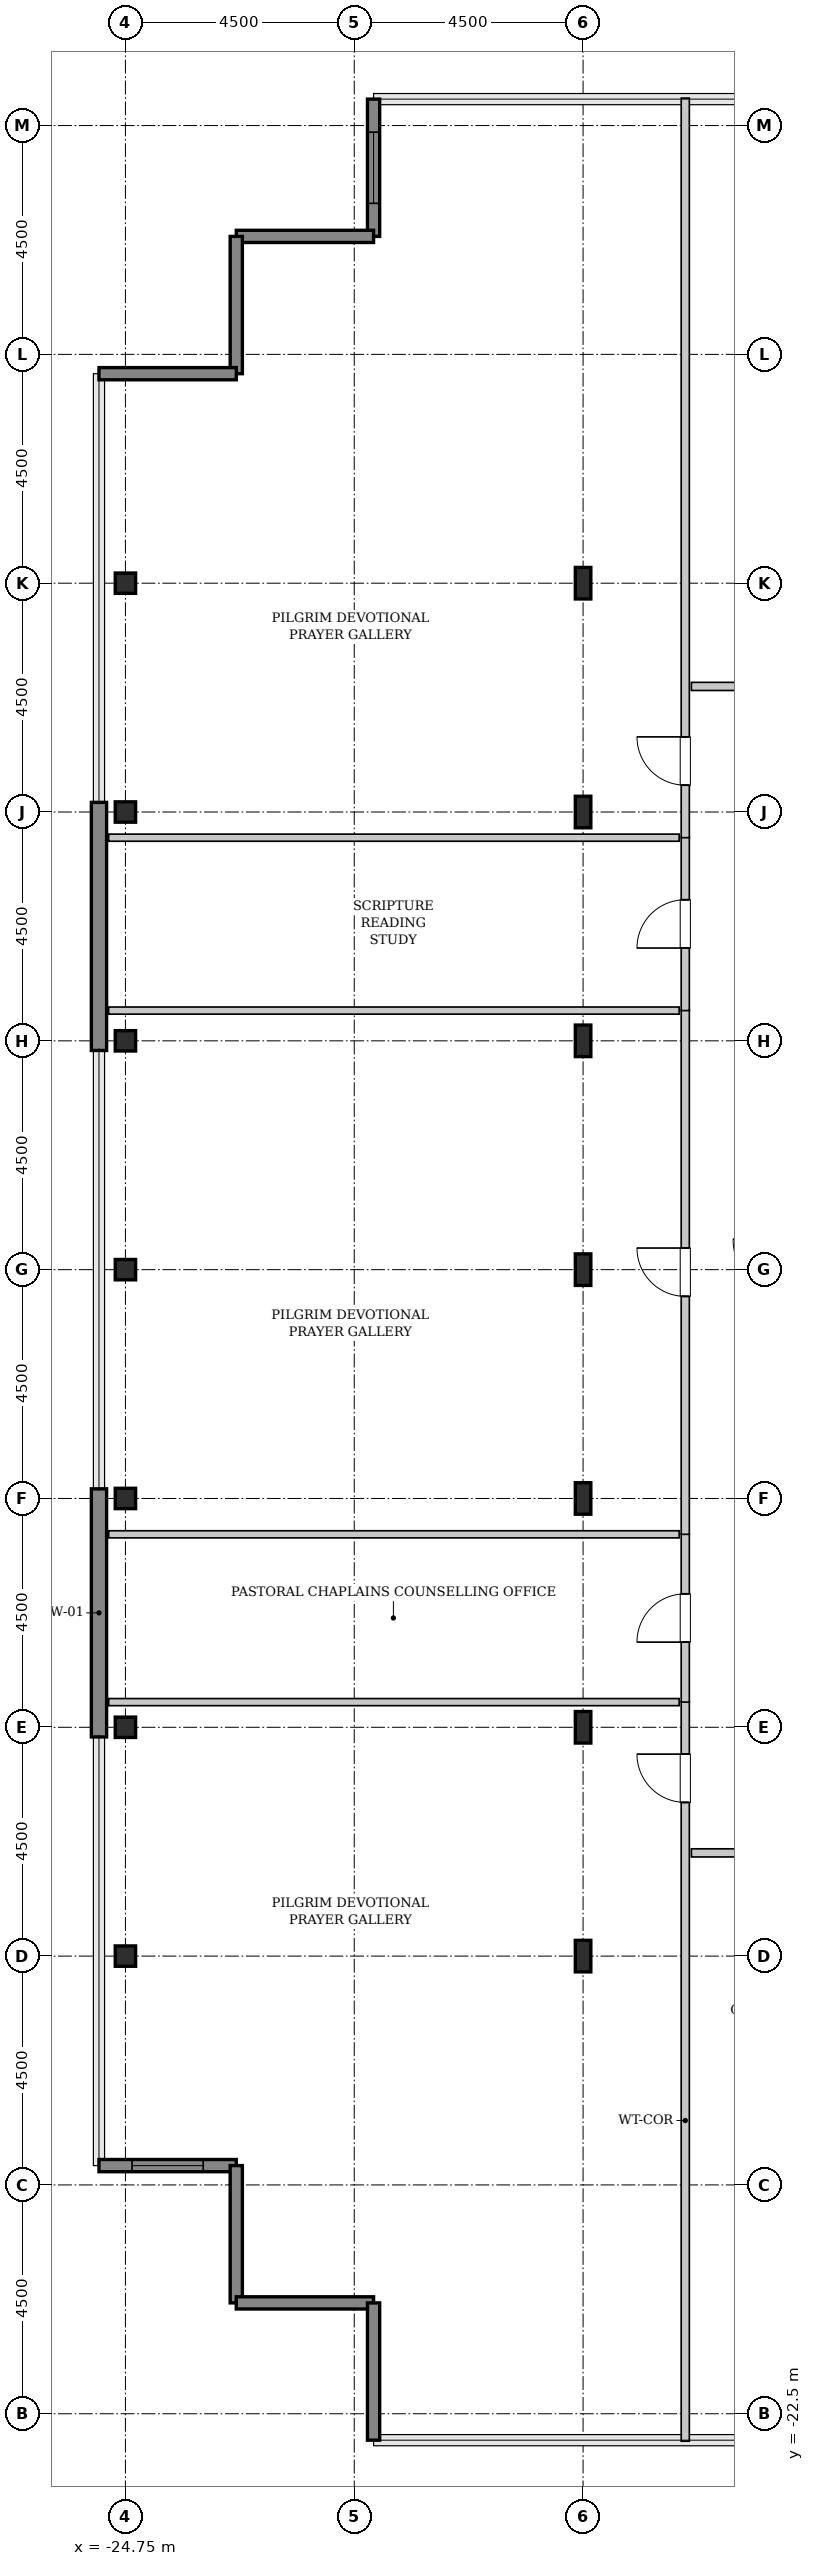
"""IFC4 building model, lengths in metres.
Left out: names, types, materials, properties, quantities, classifications, styles, units other than length and angle.
Written with IfcOpenShell. Run it as: python <this file> out.ifc"""

import sys

from ifc_helpers import new_model, si_unit, direction, frame, frame_2d, origin, origin_2d, place, context, subcontext, project, spatial, rectangle, hollow_rectangle, i_section, extrude, source, transform, mapped, element, fill, save


model = new_model("IFC4")
c1 = context("Model", 3, precision=1e-05, world=origin(), true_north=direction((0.0, 1.0)))
c2 = subcontext(c1, "Body", "Model", "MODEL_VIEW")
j1 = project(units=[si_unit("LENGTHUNIT", "METRE"), si_unit("PLANEANGLEUNIT", "RADIAN")], contexts=[c1])
p1 = place(None, origin())
s1 = spatial("IfcSite", under=j1, at=p1, CompositionType="ELEMENT")
p2 = place(p1, origin())
s2 = spatial("IfcBuilding", under=s1, at=p2, CompositionType="ELEMENT")
p3 = place(p2, frame((0.0, 0.0, 345.2)))
s3 = spatial("IfcBuildingStorey", under=s2, at=p3, CompositionType="ELEMENT", Elevation=345.2)
m1 = source(origin(), c2, "Body", "SweptSolid", [
    extrude(hollow_rectangle(XDim=0.4, YDim=0.4, WallThickness=0.02, InnerFilletRadius=0.02, OuterFilletRadius=0.04, at=origin_2d()), origin(), (0.0, 0.0, 1.0), 3.8),
])
for number, where, z_axis, x_axis in (
    (1, (-24.75, -13.5, 0.0), (0.0, 0.0, 1.0), (1.0, 0.0, 0.0)),
    (2, (-24.75, -9.0, 0.0), (0.0, 0.0, 1.0), (1.0, 0.0, 0.0)),
    (3, (-24.75, -4.5, 0.0), (0.0, 0.0, 1.0), (1.0, 0.0, 0.0)),
    (4, (-24.75, 0.0, 0.0), (0.0, 0.0, 1.0), (1.0, 0.0, 0.0)),
    (5, (-24.75, 4.5, 0.0), (0.0, 0.0, 1.0), (1.0, 0.0, 0.0)),
    (6, (-24.75, 9.0, 0.0), (0.0, 0.0, 1.0), (1.0, 0.0, 0.0)),
    (7, (-24.75, 13.5, 0.0), (0.0, 0.0, 1.0), (1.0, 0.0, 0.0)),
):
    element("IfcColumn", number, at=place(p3, frame(where, z_axis=z_axis, x_axis=x_axis)), inside=s3, PredefinedType="COLUMN", context=c2, shape_type="MappedRepresentation", body=[
        mapped(m1, transform((0.0, 0.0, 0.0), x_axis=(1.0, 0.0, 0.0), y_axis=(0.0, 1.0, 0.0), z_axis=(0.0, 0.0, 1.0), scale=1.0)),
    ])
m2 = source(origin(), c2, "Body", "SweptSolid", [
    extrude(i_section(OverallWidth=0.305, OverallDepth=0.62, WebThickness=0.021, FlangeThickness=0.04, FilletRadius=0.027, at=origin_2d()), origin(), (0.0, 0.0, 1.0), 3.8),
])
for number, where, z_axis, x_axis in (
    (8, (-15.75, -13.5, 0.0), (0.0, 0.0, 1.0), (1.0, 0.0, 0.0)),
    (9, (-15.75, -9.0, 0.0), (0.0, 0.0, 1.0), (1.0, 0.0, 0.0)),
    (10, (-15.75, -4.5, 0.0), (0.0, 0.0, 1.0), (1.0, 0.0, 0.0)),
    (11, (-15.75, 0.0, 0.0), (0.0, 0.0, 1.0), (1.0, 0.0, 0.0)),
    (12, (-15.75, 4.5, 0.0), (0.0, 0.0, 1.0), (1.0, 0.0, 0.0)),
    (13, (-15.75, 9.0, 0.0), (0.0, 0.0, 1.0), (1.0, 0.0, 0.0)),
    (14, (-15.75, 13.5, 0.0), (0.0, 0.0, 1.0), (1.0, 0.0, 0.0)),
):
    element("IfcColumn", number, at=place(p3, frame(where, z_axis=z_axis, x_axis=x_axis)), inside=s3, PredefinedType="COLUMN", context=c2, shape_type="MappedRepresentation", body=[
        mapped(m2, transform((0.0, 0.0, 0.0), x_axis=(1.0, 0.0, 0.0), y_axis=(0.0, 1.0, 0.0), z_axis=(0.0, 0.0, 1.0), scale=1.0)),
    ])
m3 = source(origin(), c2, "Body", "SweptSolid", [
    extrude(rectangle(XDim=4.88, YDim=0.3, at=frame_2d((2.44, 0.0))), origin(), (0.0, 0.0, 1.0), 3.5),
])
for number, where, z_axis, x_axis in (
    (15, (-25.27, -9.19, 0.0), (0.0, 0.0, 1.0), (0.0, 1.0, 0.0)),
    (16, (-25.27, 4.31, 0.0), (0.0, 0.0, 1.0), (0.0, 1.0, 0.0)),
):
    element("IfcWall", number, at=place(p3, frame(where, z_axis=z_axis, x_axis=x_axis)), inside=s3, PredefinedType="SHEAR", context=c2, shape_type="MappedRepresentation", body=[
        mapped(m3, transform((0.0, 0.0, 0.0), x_axis=(1.0, 0.0, 0.0), y_axis=(0.0, 1.0, 0.0), z_axis=(0.0, 0.0, 1.0), scale=1.0)),
    ])
m4 = source(origin(), c2, "Body", "SweptSolid", [
    extrude(rectangle(XDim=2.7, YDim=0.24, at=frame_2d((1.35, 0.0))), origin(), (0.0, 0.0, 1.0), 3.5),
])
p4 = place(p3, frame((-19.87, 23.02, 0.0), z_axis=(0.0, 0.0, 1.0), x_axis=(0.0, -1.0, 0.0)))
e17 = element("IfcWall", 17, at=p4, inside=s3, PredefinedType="SHEAR", context=c2, shape_type="MappedRepresentation", body=[
    mapped(m4, transform((0.0, 0.0, 0.0), x_axis=(1.0, 0.0, 0.0), y_axis=(0.0, 1.0, 0.0), z_axis=(0.0, 0.0, 1.0), scale=1.0)),
])
p5 = place(p4, frame((0.65, 0.0, 0.85)))
e18 = element("IfcOpeningElement", 18, at=p5, cuts=e17, PredefinedType="OPENING", context=c2, shape_type="SweptSolid", body=[
    extrude(rectangle(XDim=1.4, YDim=1.8, at=frame_2d((0.7, 0.9))), frame((0.0, 0.13, 0.0), z_axis=(0.0, -1.0, 0.0), x_axis=(1.0, 0.0, 0.0)), (0.0, 0.0, 1.0), 0.26),
])
for number, where, z_axis, x_axis in (
    (19, (-19.87, 20.32, 0.0), (0.0, 0.0, 1.0), (-1.0, 0.0, 0.0)),
    (20, (-22.57, 20.32, 0.0), (0.0, 0.0, 1.0), (0.0, -1.0, 0.0)),
    (21, (-22.57, 17.62, 0.0), (0.0, 0.0, 1.0), (-1.0, 0.0, 0.0)),
):
    element("IfcWall", number, at=place(p3, frame(where, z_axis=z_axis, x_axis=x_axis)), inside=s3, PredefinedType="SHEAR", context=c2, shape_type="MappedRepresentation", body=[
        mapped(m4, transform((0.0, 0.0, 0.0), x_axis=(1.0, 0.0, 0.0), y_axis=(0.0, 1.0, 0.0), z_axis=(0.0, 0.0, 1.0), scale=1.0)),
    ])
p6 = place(p3, frame((-25.27, -17.62, 0.0), z_axis=(0.0, 0.0, 1.0), x_axis=(1.0, 0.0, 0.0)))
e22 = element("IfcWall", 22, at=p6, inside=s3, PredefinedType="SHEAR", context=c2, shape_type="MappedRepresentation", body=[
    mapped(m4, transform((0.0, 0.0, 0.0), x_axis=(1.0, 0.0, 0.0), y_axis=(0.0, 1.0, 0.0), z_axis=(0.0, 0.0, 1.0), scale=1.0)),
])
p7 = place(p6, frame((0.65, 0.0, 0.85)))
e23 = element("IfcOpeningElement", 23, at=p7, cuts=e22, PredefinedType="OPENING", context=c2, shape_type="SweptSolid", body=[
    extrude(rectangle(XDim=1.4, YDim=1.8, at=frame_2d((0.7, 0.9))), frame((0.0, 0.13, 0.0), z_axis=(0.0, -1.0, 0.0), x_axis=(1.0, 0.0, 0.0)), (0.0, 0.0, 1.0), 0.26),
])
for number, where, z_axis, x_axis in (
    (24, (-22.57, -17.62, 0.0), (0.0, 0.0, 1.0), (0.0, -1.0, 0.0)),
    (25, (-22.57, -20.32, 0.0), (0.0, 0.0, 1.0), (1.0, 0.0, 0.0)),
    (26, (-19.87, -20.32, 0.0), (0.0, 0.0, 1.0), (0.0, -1.0, 0.0)),
):
    element("IfcWall", number, at=place(p3, frame(where, z_axis=z_axis, x_axis=x_axis)), inside=s3, PredefinedType="SHEAR", context=c2, shape_type="MappedRepresentation", body=[
        mapped(m4, transform((0.0, 0.0, 0.0), x_axis=(1.0, 0.0, 0.0), y_axis=(0.0, 1.0, 0.0), z_axis=(0.0, 0.0, 1.0), scale=1.0)),
    ])
m5 = source(origin(), c2, "Body", "SweptSolid", [
    extrude(rectangle(XDim=14.545, YDim=0.16, at=frame_2d((7.272, 0.0))), origin(), (0.0, 0.0, 1.0), 3.485),
])
p8 = place(p3, frame((-13.74, -23.04, 0.0), z_axis=(0.0, 0.0, 1.0), x_axis=(0.0, 1.0, 0.0)))
e27 = element("IfcWall", 27, at=p8, inside=s3, PredefinedType="PARTITIONING", context=c2, shape_type="MappedRepresentation", body=[
    mapped(m5, transform((0.0, 0.0, 0.0), x_axis=(1.0, 0.0, 0.0), y_axis=(0.0, 1.0, 0.0), z_axis=(0.0, 0.0, 1.0), scale=1.0)),
])
p9 = place(p8, frame((12.562, 0.0, 0.0)))
e28 = element("IfcOpeningElement", 28, at=p9, cuts=e27, PredefinedType="OPENING", context=c2, shape_type="SweptSolid", body=[
    extrude(rectangle(XDim=0.95, YDim=2.1, at=frame_2d((0.475, 1.05))), frame((0.0, 0.09, 0.0), z_axis=(0.0, -1.0, 0.0), x_axis=(1.0, 0.0, 0.0)), (0.0, 0.0, 1.0), 0.18),
])
m6 = source(origin(), c2, "Body", "SweptSolid", [
    extrude(rectangle(XDim=11.22, YDim=0.14, at=frame_2d((5.61, 0.0))), origin(), (0.0, 0.0, 1.0), 2.925),
])
p10 = place(p3, frame((-25.08, -8.505, 0.0), z_axis=(0.0, 0.0, 1.0), x_axis=(1.0, 0.0, 0.0)))
e29 = element("IfcWall", 29, at=p10, inside=s3, PredefinedType="PARTITIONING", context=c2, shape_type="MappedRepresentation", body=[
    mapped(m6, transform((0.0, 0.0, 0.0), x_axis=(1.0, 0.0, 0.0), y_axis=(0.0, 1.0, 0.0), z_axis=(0.0, 0.0, 1.0), scale=1.0)),
])
m7 = source(origin(), c2, "Body", "SweptSolid", [
    extrude(rectangle(XDim=3.31, YDim=0.16, at=frame_2d((1.655, 0.0))), origin(), (0.0, 0.0, 1.0), 3.485),
])
p11 = place(p3, frame((-13.74, -8.505, 0.0), z_axis=(0.0, 0.0, 1.0), x_axis=(0.0, 1.0, 0.0)))
e30 = element("IfcWall", 30, at=p11, inside=s3, PredefinedType="PARTITIONING", context=c2, shape_type="MappedRepresentation", body=[
    mapped(m7, transform((0.0, 0.0, 0.0), x_axis=(1.0, 0.0, 0.0), y_axis=(0.0, 1.0, 0.0), z_axis=(0.0, 0.0, 1.0), scale=1.0)),
])
p12 = place(p11, frame((1.18, 0.0, 0.0)))
e31 = element("IfcOpeningElement", 31, at=p12, cuts=e30, PredefinedType="OPENING", context=c2, shape_type="SweptSolid", body=[
    extrude(rectangle(XDim=0.95, YDim=2.1, at=frame_2d((0.475, 1.05))), frame((0.0, 0.09, 0.0), z_axis=(0.0, -1.0, 0.0), x_axis=(1.0, 0.0, 0.0)), (0.0, 0.0, 1.0), 0.18),
])
m8 = source(origin(), c2, "Body", "SweptSolid", [
    extrude(rectangle(XDim=11.22, YDim=0.14, at=frame_2d((5.61, 0.0))), origin(), (0.0, 0.0, 1.0), 3.485),
])
p13 = place(p3, frame((-25.08, -5.205, 0.0), z_axis=(0.0, 0.0, 1.0), x_axis=(1.0, 0.0, 0.0)))
e32 = element("IfcWall", 32, at=p13, inside=s3, PredefinedType="PARTITIONING", context=c2, shape_type="MappedRepresentation", body=[
    mapped(m8, transform((0.0, 0.0, 0.0), x_axis=(1.0, 0.0, 0.0), y_axis=(0.0, 1.0, 0.0), z_axis=(0.0, 0.0, 1.0), scale=1.0)),
])
m9 = source(origin(), c2, "Body", "SweptSolid", [
    extrude(rectangle(XDim=10.31, YDim=0.16, at=frame_2d((5.155, 0.0))), origin(), (0.0, 0.0, 1.0), 3.485),
])
p14 = place(p3, frame((-13.74, -5.205, 0.0), z_axis=(0.0, 0.0, 1.0), x_axis=(0.0, 1.0, 0.0)))
e33 = element("IfcWall", 33, at=p14, inside=s3, PredefinedType="PARTITIONING", context=c2, shape_type="MappedRepresentation", body=[
    mapped(m9, transform((0.0, 0.0, 0.0), x_axis=(1.0, 0.0, 0.0), y_axis=(0.0, 1.0, 0.0), z_axis=(0.0, 0.0, 1.0), scale=1.0)),
])
p15 = place(p14, frame((4.68, 0.0, 0.0)))
e34 = element("IfcOpeningElement", 34, at=p15, cuts=e33, PredefinedType="OPENING", context=c2, shape_type="SweptSolid", body=[
    extrude(rectangle(XDim=0.95, YDim=2.1, at=frame_2d((0.475, 1.05))), frame((0.0, 0.09, 0.0), z_axis=(0.0, -1.0, 0.0), x_axis=(1.0, 0.0, 0.0)), (0.0, 0.0, 1.0), 0.18),
])
p16 = place(p3, frame((-25.08, 5.095, 0.0), z_axis=(0.0, 0.0, 1.0), x_axis=(1.0, 0.0, 0.0)))
e35 = element("IfcWall", 35, at=p16, inside=s3, PredefinedType="PARTITIONING", context=c2, shape_type="MappedRepresentation", body=[
    mapped(m8, transform((0.0, 0.0, 0.0), x_axis=(1.0, 0.0, 0.0), y_axis=(0.0, 1.0, 0.0), z_axis=(0.0, 0.0, 1.0), scale=1.0)),
])
m10 = source(origin(), c2, "Body", "SweptSolid", [
    extrude(rectangle(XDim=3.41, YDim=0.16, at=frame_2d((1.705, 0.0))), origin(), (0.0, 0.0, 1.0), 3.485),
])
p17 = place(p3, frame((-13.74, 5.095, 0.0), z_axis=(0.0, 0.0, 1.0), x_axis=(0.0, 1.0, 0.0)))
e36 = element("IfcWall", 36, at=p17, inside=s3, PredefinedType="PARTITIONING", context=c2, shape_type="MappedRepresentation", body=[
    mapped(m10, transform((0.0, 0.0, 0.0), x_axis=(1.0, 0.0, 0.0), y_axis=(0.0, 1.0, 0.0), z_axis=(0.0, 0.0, 1.0), scale=1.0)),
])
p18 = place(p17, frame((1.23, 0.0, 0.0)))
e37 = element("IfcOpeningElement", 37, at=p18, cuts=e36, PredefinedType="OPENING", context=c2, shape_type="SweptSolid", body=[
    extrude(rectangle(XDim=0.95, YDim=2.1, at=frame_2d((0.475, 1.05))), frame((0.0, 0.09, 0.0), z_axis=(0.0, -1.0, 0.0), x_axis=(1.0, 0.0, 0.0)), (0.0, 0.0, 1.0), 0.18),
])
p19 = place(p3, frame((-25.08, 8.495, 0.0), z_axis=(0.0, 0.0, 1.0), x_axis=(1.0, 0.0, 0.0)))
e38 = element("IfcWall", 38, at=p19, inside=s3, PredefinedType="PARTITIONING", context=c2, shape_type="MappedRepresentation", body=[
    mapped(m6, transform((0.0, 0.0, 0.0), x_axis=(1.0, 0.0, 0.0), y_axis=(0.0, 1.0, 0.0), z_axis=(0.0, 0.0, 1.0), scale=1.0)),
])
p20 = place(p3, frame((-13.74, 8.495, 0.0), z_axis=(0.0, 0.0, 1.0), x_axis=(0.0, 1.0, 0.0)))
e39 = element("IfcWall", 39, at=p20, inside=s3, PredefinedType="PARTITIONING", context=c2, shape_type="MappedRepresentation", body=[
    mapped(m5, transform((0.0, 0.0, 0.0), x_axis=(1.0, 0.0, 0.0), y_axis=(0.0, 1.0, 0.0), z_axis=(0.0, 0.0, 1.0), scale=1.0)),
])
p21 = place(p20, frame((1.032, 0.0, 0.0)))
e40 = element("IfcOpeningElement", 40, at=p21, cuts=e39, PredefinedType="OPENING", context=c2, shape_type="SweptSolid", body=[
    extrude(rectangle(XDim=0.95, YDim=2.1, at=frame_2d((0.475, 1.05))), frame((0.0, 0.09, 0.0), z_axis=(0.0, -1.0, 0.0), x_axis=(1.0, 0.0, 0.0)), (0.0, 0.0, 1.0), 0.18),
])
m11 = source(origin(), c2, "Body", "SweptSolid", [
    extrude(rectangle(XDim=4.125, YDim=0.16, at=frame_2d((2.062, 0.0))), origin(), (0.0, 0.0, 1.0), 3.485),
])
p22 = place(p3, frame((-13.62, 11.47, 0.0), z_axis=(0.0, 0.0, 1.0), x_axis=(1.0, 0.0, 0.0)))
e41 = element("IfcWall", 41, at=p22, inside=s3, PredefinedType="PARTITIONING", context=c2, shape_type="MappedRepresentation", body=[
    mapped(m11, transform((0.0, 0.0, 0.0), x_axis=(1.0, 0.0, 0.0), y_axis=(0.0, 1.0, 0.0), z_axis=(0.0, 0.0, 1.0), scale=1.0)),
])
p23 = place(p22, frame((1.587, 0.0, 0.0)))
e42 = element("IfcOpeningElement", 42, at=p23, cuts=e41, PredefinedType="OPENING", context=c2, shape_type="SweptSolid", body=[
    extrude(rectangle(XDim=0.95, YDim=2.1, at=frame_2d((0.475, 1.05))), frame((0.0, 0.09, 0.0), z_axis=(0.0, -1.0, 0.0), x_axis=(1.0, 0.0, 0.0)), (0.0, 0.0, 1.0), 0.18),
])
m12 = source(origin(), c2, "Body", "SweptSolid", [
    extrude(rectangle(XDim=4.025, YDim=0.16, at=frame_2d((2.013, 0.0))), origin(), (0.0, 0.0, 1.0), 3.485),
])
p24 = place(p3, frame((-13.62, -11.47, 0.0), z_axis=(0.0, 0.0, 1.0), x_axis=(1.0, 0.0, 0.0)))
e43 = element("IfcWall", 43, at=p24, inside=s3, PredefinedType="PARTITIONING", context=c2, shape_type="MappedRepresentation", body=[
    mapped(m12, transform((0.0, 0.0, 0.0), x_axis=(1.0, 0.0, 0.0), y_axis=(0.0, 1.0, 0.0), z_axis=(0.0, 0.0, 1.0), scale=1.0)),
])
p25 = place(p24, frame((1.538, 0.0, 0.0)))
e44 = element("IfcOpeningElement", 44, at=p25, cuts=e43, PredefinedType="OPENING", context=c2, shape_type="SweptSolid", body=[
    extrude(rectangle(XDim=0.95, YDim=2.1, at=frame_2d((0.475, 1.05))), frame((0.0, 0.09, 0.0), z_axis=(0.0, -1.0, 0.0), x_axis=(1.0, 0.0, 0.0)), (0.0, 0.0, 1.0), 0.18),
])
m13 = source(origin(), c2, "Body", "SweptSolid", [
    extrude(rectangle(XDim=1.4, YDim=1.8, at=frame_2d((0.7, 0.9))), frame((0.0, 0.03, 0.0), z_axis=(0.0, -1.0, 0.0), x_axis=(1.0, 0.0, 0.0)), (0.0, 0.0, 1.0), 0.06),
])
p26 = place(p5, origin())
e45 = element("IfcWindow", 45, at=p26, inside=s3, PartitioningType="SINGLE_PANEL", PredefinedType="WINDOW", context=c2, shape_type="MappedRepresentation", body=[
    mapped(m13, transform((0.0, 0.0, 0.0), x_axis=(1.0, 0.0, 0.0), y_axis=(0.0, 1.0, 0.0), z_axis=(0.0, 0.0, 1.0), scale=1.0)),
])
fill(e18, e45)
p27 = place(p7, origin())
e46 = element("IfcWindow", 46, at=p27, inside=s3, PartitioningType="SINGLE_PANEL", PredefinedType="WINDOW", context=c2, shape_type="MappedRepresentation", body=[
    mapped(m13, transform((0.0, 0.0, 0.0), x_axis=(1.0, 0.0, 0.0), y_axis=(0.0, 1.0, 0.0), z_axis=(0.0, 0.0, 1.0), scale=1.0)),
])
fill(e23, e46)
m14 = source(origin(), c2, "Body", "SweptSolid", [
    extrude(rectangle(XDim=0.95, YDim=2.1, at=frame_2d((0.475, 1.05))), frame((0.0, 0.025, 0.0), z_axis=(0.0, -1.0, 0.0), x_axis=(1.0, 0.0, 0.0)), (0.0, 0.0, 1.0), 0.05),
])
p28 = place(p9, origin())
e47 = element("IfcDoor", 47, at=p28, inside=s3, OperationType="SINGLE_SWING_RIGHT", PredefinedType="DOOR", context=c2, shape_type="MappedRepresentation", body=[
    mapped(m14, transform((0.0, 0.0, 0.0), x_axis=(1.0, 0.0, 0.0), y_axis=(0.0, 1.0, 0.0), z_axis=(0.0, 0.0, 1.0), scale=1.0)),
])
fill(e28, e47)
p29 = place(p12, origin())
e48 = element("IfcDoor", 48, at=p29, inside=s3, OperationType="SINGLE_SWING_LEFT", PredefinedType="DOOR", context=c2, shape_type="MappedRepresentation", body=[
    mapped(m14, transform((0.0, 0.0, 0.0), x_axis=(1.0, 0.0, 0.0), y_axis=(0.0, 1.0, 0.0), z_axis=(0.0, 0.0, 1.0), scale=1.0)),
])
fill(e31, e48)
p30 = place(p15, origin())
e49 = element("IfcDoor", 49, at=p30, inside=s3, OperationType="SINGLE_SWING_RIGHT", PredefinedType="DOOR", context=c2, shape_type="MappedRepresentation", body=[
    mapped(m14, transform((0.0, 0.0, 0.0), x_axis=(1.0, 0.0, 0.0), y_axis=(0.0, 1.0, 0.0), z_axis=(0.0, 0.0, 1.0), scale=1.0)),
])
fill(e34, e49)
p31 = place(p18, origin())
e50 = element("IfcDoor", 50, at=p31, inside=s3, OperationType="SINGLE_SWING_LEFT", PredefinedType="DOOR", context=c2, shape_type="MappedRepresentation", body=[
    mapped(m14, transform((0.0, 0.0, 0.0), x_axis=(1.0, 0.0, 0.0), y_axis=(0.0, 1.0, 0.0), z_axis=(0.0, 0.0, 1.0), scale=1.0)),
])
fill(e37, e50)
p32 = place(p21, origin())
e51 = element("IfcDoor", 51, at=p32, inside=s3, OperationType="SINGLE_SWING_RIGHT", PredefinedType="DOOR", context=c2, shape_type="MappedRepresentation", body=[
    mapped(m14, transform((0.0, 0.0, 0.0), x_axis=(1.0, 0.0, 0.0), y_axis=(0.0, 1.0, 0.0), z_axis=(0.0, 0.0, 1.0), scale=1.0)),
])
fill(e40, e51)
save(model, sys.argv[1])
